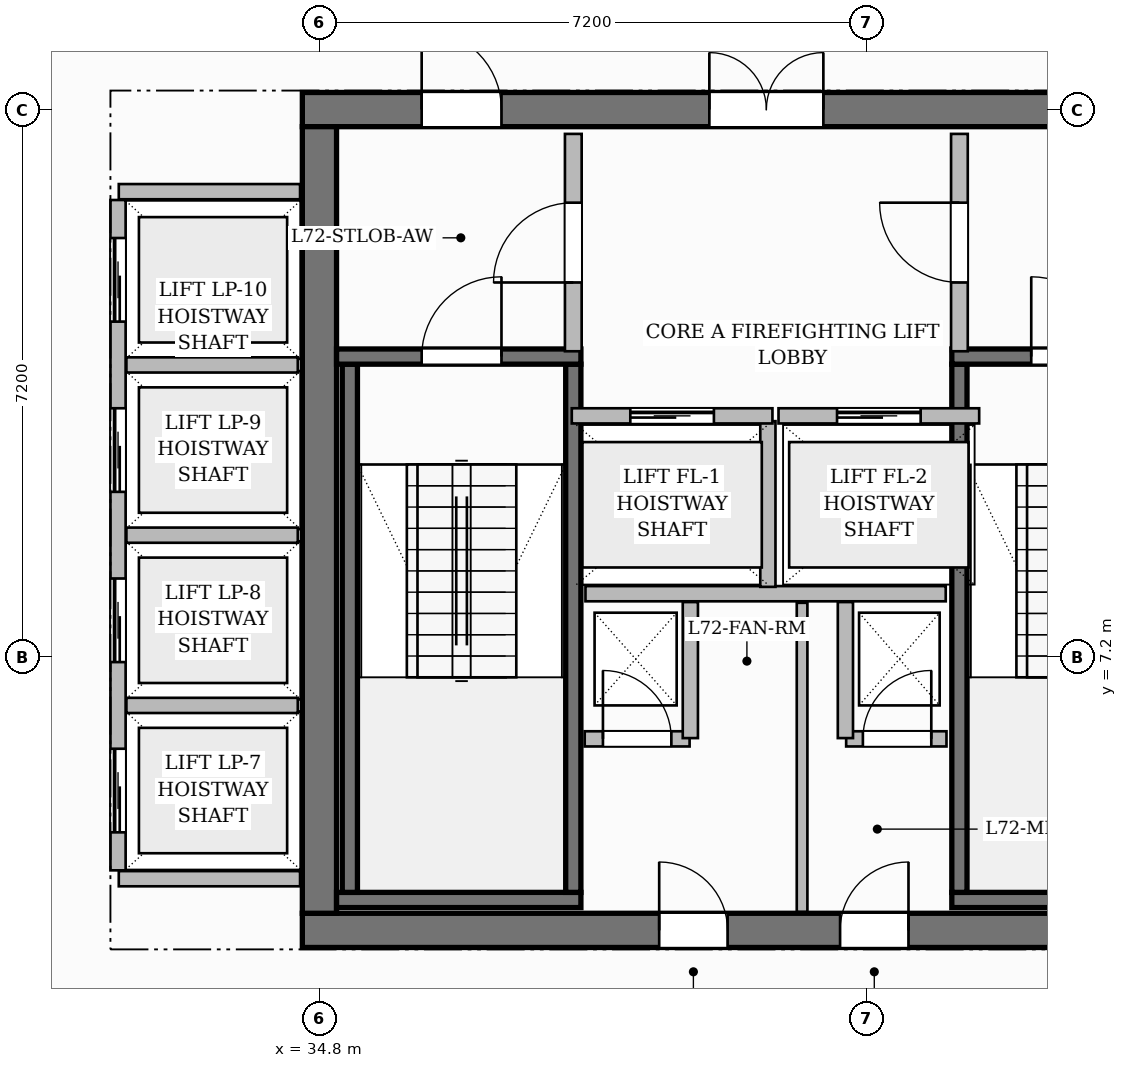
"""IFC4 building model, lengths in metres.
Left out: names, types, materials, properties, quantities, classifications, styles, units other than length and angle.
Written with IfcOpenShell. Run it as: python <this file> out.ifc"""

import sys

from ifc_helpers import new_model, si_unit, direction, frame, frame_2d, origin, place, context, subcontext, project, spatial, rectangle, extrude, source, transform, mapped, element, fill, save


model = new_model("IFC4")
c1 = context("Model", 3, precision=1e-05, world=origin(), true_north=direction((0.0, 1.0)))
c2 = subcontext(c1, "Body", "Model", "MODEL_VIEW")
j1 = project(units=[si_unit("LENGTHUNIT", "METRE"), si_unit("PLANEANGLEUNIT", "RADIAN")], contexts=[c1])
p1 = place(None, origin())
s1 = spatial("IfcSite", under=j1, at=p1, CompositionType="ELEMENT")
p2 = place(p1, origin())
s2 = spatial("IfcBuilding", under=s1, at=p2, CompositionType="ELEMENT")
p3 = place(p2, frame((0.0, 0.0, 286.6)))
s3 = spatial("IfcBuildingStorey", under=s2, at=p3, CompositionType="ELEMENT", Elevation=286.6)
p4 = place(p3, frame((34.575, 3.6, 0.0), z_axis=(0.0, 0.0, 1.0), x_axis=(1.0, 0.0, 0.0)))
e1 = element("IfcWall", 1, at=p4, inside=s3, PredefinedType="SHEAR", context=c2, shape_type="SweptSolid", body=[
    extrude(rectangle(XDim=15.45, YDim=0.45, at=frame_2d((7.725, 0.0))), origin(), (0.0, 0.0, 1.0), 3.85),
])
p5 = place(p4, frame((4.695, 0.0, 0.0)))
e2 = element("IfcOpeningElement", 2, at=p5, cuts=e1, PredefinedType="OPENING", context=c2, shape_type="SweptSolid", body=[
    extrude(rectangle(XDim=0.9, YDim=2.1, at=frame_2d((0.45, 1.05))), frame((0.0, 0.235, 0.0), z_axis=(0.0, -1.0, 0.0), x_axis=(1.0, 0.0, 0.0)), (0.0, 0.0, 1.0), 0.47),
])
p6 = place(p4, frame((7.075, 0.0, 0.0)))
e3 = element("IfcOpeningElement", 3, at=p6, cuts=e1, PredefinedType="OPENING", context=c2, shape_type="SweptSolid", body=[
    extrude(rectangle(XDim=0.9, YDim=2.1, at=frame_2d((0.45, 1.05))), frame((0.0, 0.235, 0.0), z_axis=(0.0, -1.0, 0.0), x_axis=(1.0, 0.0, 0.0)), (0.0, 0.0, 1.0), 0.47),
])
p7 = place(p3, frame((34.575, 14.4, 0.0), z_axis=(0.0, 0.0, 1.0), x_axis=(1.0, 0.0, 0.0)))
e4 = element("IfcWall", 4, at=p7, inside=s3, PredefinedType="SHEAR", context=c2, shape_type="SweptSolid", body=[
    extrude(rectangle(XDim=15.45, YDim=0.45, at=frame_2d((7.725, 0.0))), origin(), (0.0, 0.0, 1.0), 3.85),
])
p8 = place(p7, frame((5.355, 0.0, 0.0)))
e5 = element("IfcOpeningElement", 5, at=p8, cuts=e4, PredefinedType="OPENING", context=c2, shape_type="SweptSolid", body=[
    extrude(rectangle(XDim=1.5, YDim=2.2, at=frame_2d((0.75, 1.1))), frame((0.0, 0.235, 0.0), z_axis=(0.0, -1.0, 0.0), x_axis=(1.0, 0.0, 0.0)), (0.0, 0.0, 1.0), 0.47),
])
p9 = place(p7, frame((1.57, 0.0, 0.0)))
e6 = element("IfcOpeningElement", 6, at=p9, cuts=e4, PredefinedType="OPENING", context=c2, shape_type="SweptSolid", body=[
    extrude(rectangle(XDim=1.05, YDim=2.15, at=frame_2d((0.525, 1.075))), frame((0.0, 0.235, 0.0), z_axis=(0.0, -1.0, 0.0), x_axis=(1.0, 0.0, 0.0)), (0.0, 0.0, 1.0), 0.47),
])
p10 = place(p7, frame((11.2, 0.0, 0.0)))
e7 = element("IfcOpeningElement", 7, at=p10, cuts=e4, PredefinedType="OPENING", context=c2, shape_type="SweptSolid", body=[
    extrude(rectangle(XDim=1.05, YDim=2.15, at=frame_2d((0.525, 1.075))), frame((0.0, 0.235, 0.0), z_axis=(0.0, -1.0, 0.0), x_axis=(1.0, 0.0, 0.0)), (0.0, 0.0, 1.0), 0.47),
])
p11 = place(p3, frame((34.8, 3.825, 0.0), z_axis=(0.0, 0.0, 1.0), x_axis=(0.0, 1.0, 0.0)))
e8 = element("IfcWall", 8, at=p11, inside=s3, PredefinedType="SHEAR", context=c2, shape_type="SweptSolid", body=[
    extrude(rectangle(XDim=10.35, YDim=0.45, at=frame_2d((5.175, 0.0))), origin(), (0.0, 0.0, 1.0), 3.85),
])
p12 = place(p3, frame((35.025, 4.0, 0.0), z_axis=(0.0, 0.0, 1.0), x_axis=(1.0, 0.0, 0.0)))
e9 = element("IfcWall", 9, at=p12, inside=s3, PredefinedType="SHEAR", context=c2, shape_type="SweptSolid", body=[
    extrude(rectangle(XDim=3.215, YDim=0.2, at=frame_2d((1.607, 0.0))), origin(), (0.0, 0.0, 1.0), 3.85),
])
for number, where, z_axis, x_axis in (
    (10, (35.2, 4.1, 0.0), (0.0, 0.0, 1.0), (0.0, 1.0, 0.0)),
    (11, (38.14, 4.1, 0.0), (0.0, 0.0, 1.0), (0.0, 1.0, 0.0)),
):
    element("IfcWall", number, at=place(p3, frame(where, z_axis=z_axis, x_axis=x_axis)), inside=s3, PredefinedType="SHEAR", context=c2, shape_type="SweptSolid", body=[
        extrude(rectangle(XDim=6.95, YDim=0.2, at=frame_2d((3.475, 0.0))), origin(), (0.0, 0.0, 1.0), 3.85),
    ])
p13 = place(p3, frame((35.025, 11.15, 0.0), z_axis=(0.0, 0.0, 1.0), x_axis=(1.0, 0.0, 0.0)))
e12 = element("IfcWall", 12, at=p13, inside=s3, PredefinedType="SHEAR", context=c2, shape_type="SweptSolid", body=[
    extrude(rectangle(XDim=3.215, YDim=0.2, at=frame_2d((1.607, 0.0))), origin(), (0.0, 0.0, 1.0), 3.85),
])
p14 = place(p13, frame((1.12, 0.0, 0.0)))
e13 = element("IfcOpeningElement", 13, at=p14, cuts=e12, PredefinedType="OPENING", context=c2, shape_type="SweptSolid", body=[
    extrude(rectangle(XDim=1.05, YDim=2.2, at=frame_2d((0.525, 1.1))), frame((0.0, 0.11, 0.0), z_axis=(0.0, -1.0, 0.0), x_axis=(1.0, 0.0, 0.0)), (0.0, 0.0, 1.0), 0.22),
])
p15 = place(p3, frame((43.12, 4.0, 0.0), z_axis=(0.0, 0.0, 1.0), x_axis=(1.0, 0.0, 0.0)))
e14 = element("IfcWall", 14, at=p15, inside=s3, PredefinedType="SHEAR", context=c2, shape_type="SweptSolid", body=[
    extrude(rectangle(XDim=6.455, YDim=0.2, at=frame_2d((3.228, 0.0))), origin(), (0.0, 0.0, 1.0), 3.85),
])
p16 = place(p3, frame((43.22, 4.1, 0.0), z_axis=(0.0, 0.0, 1.0), x_axis=(0.0, 1.0, 0.0)))
e15 = element("IfcWall", 15, at=p16, inside=s3, PredefinedType="SHEAR", context=c2, shape_type="SweptSolid", body=[
    extrude(rectangle(XDim=6.95, YDim=0.2, at=frame_2d((3.475, 0.0))), origin(), (0.0, 0.0, 1.0), 3.85),
])
p17 = place(p3, frame((43.12, 11.15, 0.0), z_axis=(0.0, 0.0, 1.0), x_axis=(1.0, 0.0, 0.0)))
e16 = element("IfcWall", 16, at=p17, inside=s3, PredefinedType="SHEAR", context=c2, shape_type="SweptSolid", body=[
    extrude(rectangle(XDim=6.455, YDim=0.2, at=frame_2d((3.228, 0.0))), origin(), (0.0, 0.0, 1.0), 3.85),
])
p18 = place(p17, frame((1.045, 0.0, 0.0)))
e17 = element("IfcOpeningElement", 17, at=p18, cuts=e16, PredefinedType="OPENING", context=c2, shape_type="SweptSolid", body=[
    extrude(rectangle(XDim=1.05, YDim=2.2, at=frame_2d((0.525, 1.1))), frame((0.0, 0.11, 0.0), z_axis=(0.0, -1.0, 0.0), x_axis=(1.0, 0.0, 0.0)), (0.0, 0.0, 1.0), 0.22),
])
p19 = place(p17, frame((4.125, 0.0, 0.0)))
e18 = element("IfcOpeningElement", 18, at=p19, cuts=e16, PredefinedType="OPENING", context=c2, shape_type="SweptSolid", body=[
    extrude(rectangle(XDim=1.05, YDim=2.2, at=frame_2d((0.525, 1.1))), frame((0.0, 0.11, 0.0), z_axis=(0.0, -1.0, 0.0), x_axis=(1.0, 0.0, 0.0)), (0.0, 0.0, 1.0), 0.22),
])
p20 = place(p3, frame((38.3, 8.03, 0.0), z_axis=(0.0, 0.0, 1.0), x_axis=(1.0, 0.0, 0.0)))
e19 = element("IfcWall", 19, at=p20, inside=s3, PredefinedType="PARTITIONING", context=c2, shape_type="SweptSolid", body=[
    extrude(rectangle(XDim=4.74, YDim=0.2, at=frame_2d((2.37, 0.0))), origin(), (0.0, 0.0, 1.0), 3.6),
])
p21 = place(p3, frame((40.7, 8.12, 0.0), z_axis=(0.0, 0.0, 1.0), x_axis=(0.0, 1.0, 0.0)))
e20 = element("IfcWall", 20, at=p21, inside=s3, PredefinedType="PARTITIONING", context=c2, shape_type="SweptSolid", body=[
    extrude(rectangle(XDim=2.18, YDim=0.2, at=frame_2d((1.09, 0.0))), origin(), (0.0, 0.0, 1.0), 3.6),
])
p22 = place(p3, frame((38.14, 11.22, 0.0), z_axis=(0.0, 0.0, 1.0), x_axis=(0.0, 1.0, 0.0)))
e21 = element("IfcWall", 21, at=p22, inside=s3, PredefinedType="PARTITIONING", context=c2, shape_type="SweptSolid", body=[
    extrude(rectangle(XDim=2.86, YDim=0.22, at=frame_2d((1.43, 0.0))), origin(), (0.0, 0.0, 1.0), 3.6),
])
p23 = place(p22, frame((0.905, 0.0, 0.0)))
e22 = element("IfcOpeningElement", 22, at=p23, cuts=e21, PredefinedType="OPENING", context=c2, shape_type="SweptSolid", body=[
    extrude(rectangle(XDim=1.05, YDim=2.15, at=frame_2d((0.525, 1.075))), frame((0.0, 0.12, 0.0), z_axis=(0.0, -1.0, 0.0), x_axis=(1.0, 0.0, 0.0)), (0.0, 0.0, 1.0), 0.24),
])
p24 = place(p3, frame((43.22, 11.22, 0.0), z_axis=(0.0, 0.0, 1.0), x_axis=(0.0, 1.0, 0.0)))
e23 = element("IfcWall", 23, at=p24, inside=s3, PredefinedType="PARTITIONING", context=c2, shape_type="SweptSolid", body=[
    extrude(rectangle(XDim=2.86, YDim=0.22, at=frame_2d((1.43, 0.0))), origin(), (0.0, 0.0, 1.0), 3.6),
])
p25 = place(p24, frame((0.905, 0.0, 0.0)))
e24 = element("IfcOpeningElement", 24, at=p25, cuts=e23, PredefinedType="OPENING", context=c2, shape_type="SweptSolid", body=[
    extrude(rectangle(XDim=1.05, YDim=2.15, at=frame_2d((0.525, 1.075))), frame((0.0, 0.12, 0.0), z_axis=(0.0, -1.0, 0.0), x_axis=(1.0, 0.0, 0.0)), (0.0, 0.0, 1.0), 0.24),
])
p26 = place(p3, frame((38.29, 6.12, 0.0), z_axis=(0.0, 0.0, 1.0), x_axis=(1.0, 0.0, 0.0)))
e25 = element("IfcWall", 25, at=p26, inside=s3, PredefinedType="PARTITIONING", context=c2, shape_type="SweptSolid", body=[
    extrude(rectangle(XDim=1.38, YDim=0.2, at=frame_2d((0.69, 0.0))), origin(), (0.0, 0.0, 1.0), 3.6),
])
p27 = place(p26, frame((0.24, 0.0, 0.0)))
e26 = element("IfcOpeningElement", 26, at=p27, cuts=e25, PredefinedType="OPENING", context=c2, shape_type="SweptSolid", body=[
    extrude(rectangle(XDim=0.9, YDim=2.1, at=frame_2d((0.45, 1.05))), frame((0.0, 0.11, 0.0), z_axis=(0.0, -1.0, 0.0), x_axis=(1.0, 0.0, 0.0)), (0.0, 0.0, 1.0), 0.22),
])
p28 = place(p3, frame((39.68, 6.13, 0.0), z_axis=(0.0, 0.0, 1.0), x_axis=(0.0, 1.0, 0.0)))
e27 = element("IfcWall", 27, at=p28, inside=s3, PredefinedType="PARTITIONING", context=c2, shape_type="SweptSolid", body=[
    extrude(rectangle(XDim=1.79, YDim=0.2, at=frame_2d((0.895, 0.0))), origin(), (0.0, 0.0, 1.0), 3.6),
])
p29 = place(p3, frame((41.73, 6.12, 0.0), z_axis=(0.0, 0.0, 1.0), x_axis=(1.0, 0.0, 0.0)))
e28 = element("IfcWall", 28, at=p29, inside=s3, PredefinedType="PARTITIONING", context=c2, shape_type="SweptSolid", body=[
    extrude(rectangle(XDim=1.32, YDim=0.2, at=frame_2d((0.66, 0.0))), origin(), (0.0, 0.0, 1.0), 3.6),
])
p30 = place(p29, frame((0.22, 0.0, 0.0)))
e29 = element("IfcOpeningElement", 29, at=p30, cuts=e28, PredefinedType="OPENING", context=c2, shape_type="SweptSolid", body=[
    extrude(rectangle(XDim=0.9, YDim=2.1, at=frame_2d((0.45, 1.05))), frame((0.0, 0.11, 0.0), z_axis=(0.0, -1.0, 0.0), x_axis=(1.0, 0.0, 0.0)), (0.0, 0.0, 1.0), 0.22),
])
p31 = place(p3, frame((41.72, 6.13, 0.0), z_axis=(0.0, 0.0, 1.0), x_axis=(0.0, 1.0, 0.0)))
e30 = element("IfcWall", 30, at=p31, inside=s3, PredefinedType="PARTITIONING", context=c2, shape_type="SweptSolid", body=[
    extrude(rectangle(XDim=1.79, YDim=0.2, at=frame_2d((0.895, 0.0))), origin(), (0.0, 0.0, 1.0), 3.6),
])
p32 = place(p3, frame((41.15, 3.845, 0.0), z_axis=(0.0, 0.0, 1.0), x_axis=(0.0, 1.0, 0.0)))
e31 = element("IfcWall", 31, at=p32, inside=s3, PredefinedType="PARTITIONING", context=c2, shape_type="SweptSolid", body=[
    extrude(rectangle(XDim=4.065, YDim=0.14, at=frame_2d((2.032, 0.0))), origin(), (0.0, 0.0, 1.0), 3.6),
])
for number, where, z_axis, x_axis in (
    (32, (32.16, 4.28, 0.0), (0.0, 0.0, 1.0), (1.0, 0.0, 0.0)),
    (33, (32.16, 13.32, 0.0), (0.0, 0.0, 1.0), (1.0, 0.0, 0.0)),
):
    element("IfcWall", number, at=place(p3, frame(where, z_axis=z_axis, x_axis=x_axis)), inside=s3, PredefinedType="PARTITIONING", context=c2, shape_type="SweptSolid", body=[
        extrude(rectangle(XDim=2.385, YDim=0.2, at=frame_2d((1.192, 0.0))), origin(), (0.0, 0.0, 1.0), 3.6),
    ])
p33 = place(p3, frame((32.15, 4.39, 0.0), z_axis=(0.0, 0.0, 1.0), x_axis=(0.0, 1.0, 0.0)))
e34 = element("IfcWall", 34, at=p33, inside=s3, PredefinedType="PARTITIONING", context=c2, shape_type="SweptSolid", body=[
    extrude(rectangle(XDim=8.82, YDim=0.2, at=frame_2d((4.41, 0.0))), origin(), (0.0, 0.0, 1.0), 3.6),
])
p34 = place(p33, frame((0.5, 0.0, 0.0)))
e35 = element("IfcOpeningElement", 35, at=p34, cuts=e34, PredefinedType="OPENING", context=c2, shape_type="SweptSolid", body=[
    extrude(rectangle(XDim=1.1, YDim=2.2, at=frame_2d((0.55, 1.1))), frame((0.0, 0.11, 0.0), z_axis=(0.0, -1.0, 0.0), x_axis=(1.0, 0.0, 0.0)), (0.0, 0.0, 1.0), 0.22),
])
p35 = place(p33, frame((2.74, 0.0, 0.0)))
e36 = element("IfcOpeningElement", 36, at=p35, cuts=e34, PredefinedType="OPENING", context=c2, shape_type="SweptSolid", body=[
    extrude(rectangle(XDim=1.1, YDim=2.2, at=frame_2d((0.55, 1.1))), frame((0.0, 0.11, 0.0), z_axis=(0.0, -1.0, 0.0), x_axis=(1.0, 0.0, 0.0)), (0.0, 0.0, 1.0), 0.22),
])
p36 = place(p33, frame((4.98, 0.0, 0.0)))
e37 = element("IfcOpeningElement", 37, at=p36, cuts=e34, PredefinedType="OPENING", context=c2, shape_type="SweptSolid", body=[
    extrude(rectangle(XDim=1.1, YDim=2.2, at=frame_2d((0.55, 1.1))), frame((0.0, 0.11, 0.0), z_axis=(0.0, -1.0, 0.0), x_axis=(1.0, 0.0, 0.0)), (0.0, 0.0, 1.0), 0.22),
])
p37 = place(p33, frame((7.22, 0.0, 0.0)))
e38 = element("IfcOpeningElement", 38, at=p37, cuts=e34, PredefinedType="OPENING", context=c2, shape_type="SweptSolid", body=[
    extrude(rectangle(XDim=1.1, YDim=2.2, at=frame_2d((0.55, 1.1))), frame((0.0, 0.11, 0.0), z_axis=(0.0, -1.0, 0.0), x_axis=(1.0, 0.0, 0.0)), (0.0, 0.0, 1.0), 0.22),
])
for number, where, z_axis, x_axis in (
    (39, (32.26, 6.56, 0.0), (0.0, 0.0, 1.0), (1.0, 0.0, 0.0)),
    (40, (32.26, 8.8, 0.0), (0.0, 0.0, 1.0), (1.0, 0.0, 0.0)),
    (41, (32.26, 11.04, 0.0), (0.0, 0.0, 1.0), (1.0, 0.0, 0.0)),
):
    element("IfcWall", number, at=place(p3, frame(where, z_axis=z_axis, x_axis=x_axis)), inside=s3, PredefinedType="PARTITIONING", context=c2, shape_type="SweptSolid", body=[
        extrude(rectangle(XDim=2.255, YDim=0.2, at=frame_2d((1.127, 0.0))), origin(), (0.0, 0.0, 1.0), 3.6),
    ])
p38 = place(p3, frame((38.12, 10.37, 0.0), z_axis=(0.0, 0.0, 1.0), x_axis=(1.0, 0.0, 0.0)))
e42 = element("IfcWall", 42, at=p38, inside=s3, PredefinedType="PARTITIONING", context=c2, shape_type="SweptSolid", body=[
    extrude(rectangle(XDim=2.64, YDim=0.2, at=frame_2d((1.32, 0.0))), origin(), (0.0, 0.0, 1.0), 3.6),
])
p39 = place(p38, frame((0.77, 0.0, 0.0)))
e43 = element("IfcOpeningElement", 43, at=p39, cuts=e42, PredefinedType="OPENING", context=c2, shape_type="SweptSolid", body=[
    extrude(rectangle(XDim=1.1, YDim=2.2, at=frame_2d((0.55, 1.1))), frame((0.0, 0.11, 0.0), z_axis=(0.0, -1.0, 0.0), x_axis=(1.0, 0.0, 0.0)), (0.0, 0.0, 1.0), 0.22),
])
p40 = place(p3, frame((40.84, 10.37, 0.0), z_axis=(0.0, 0.0, 1.0), x_axis=(1.0, 0.0, 0.0)))
e44 = element("IfcWall", 44, at=p40, inside=s3, PredefinedType="PARTITIONING", context=c2, shape_type="SweptSolid", body=[
    extrude(rectangle(XDim=2.64, YDim=0.2, at=frame_2d((1.32, 0.0))), origin(), (0.0, 0.0, 1.0), 3.6),
])
p41 = place(p40, frame((0.77, 0.0, 0.0)))
e45 = element("IfcOpeningElement", 45, at=p41, cuts=e44, PredefinedType="OPENING", context=c2, shape_type="SweptSolid", body=[
    extrude(rectangle(XDim=1.1, YDim=2.2, at=frame_2d((0.55, 1.1))), frame((0.0, 0.11, 0.0), z_axis=(0.0, -1.0, 0.0), x_axis=(1.0, 0.0, 0.0)), (0.0, 0.0, 1.0), 0.22),
])
m1 = source(origin(), c2, "Body", "SweptSolid", [
    extrude(rectangle(XDim=1.05, YDim=2.2, at=frame_2d((0.525, 1.1))), frame((0.0, 0.025, 0.0), z_axis=(0.0, -1.0, 0.0), x_axis=(1.0, 0.0, 0.0)), (0.0, 0.0, 1.0), 0.05),
])
p42 = place(p14, origin())
e46 = element("IfcDoor", 46, at=p42, inside=s3, OperationType="SINGLE_SWING_RIGHT", PredefinedType="DOOR", context=c2, shape_type="MappedRepresentation", body=[
    mapped(m1, transform((0.0, 0.0, 0.0), scale=1.0)),
])
fill(e13, e46)
p43 = place(p18, origin())
e47 = element("IfcDoor", 47, at=p43, inside=s3, OperationType="SINGLE_SWING_LEFT", PredefinedType="DOOR", context=c2, shape_type="MappedRepresentation", body=[
    mapped(m1, transform((0.0, 0.0, 0.0), scale=1.0)),
])
fill(e17, e47)
m2 = source(origin(), c2, "Body", "SweptSolid", [
    extrude(rectangle(XDim=1.05, YDim=2.15, at=frame_2d((0.525, 1.075))), frame((0.0, 0.025, 0.0), z_axis=(0.0, -1.0, 0.0), x_axis=(1.0, 0.0, 0.0)), (0.0, 0.0, 1.0), 0.05),
])
p44 = place(p23, origin())
e48 = element("IfcDoor", 48, at=p44, inside=s3, OperationType="SINGLE_SWING_LEFT", PredefinedType="DOOR", context=c2, shape_type="MappedRepresentation", body=[
    mapped(m2, transform((0.0, 0.0, 0.0), scale=1.0)),
])
fill(e22, e48)
p45 = place(p25, origin())
e49 = element("IfcDoor", 49, at=p45, inside=s3, OperationType="SINGLE_SWING_RIGHT", PredefinedType="DOOR", context=c2, shape_type="MappedRepresentation", body=[
    mapped(m2, transform((0.0, 0.0, 0.0), scale=1.0)),
])
fill(e24, e49)
m3 = source(origin(), c2, "Body", "SweptSolid", [
    extrude(rectangle(XDim=1.5, YDim=2.2, at=frame_2d((0.75, 1.1))), frame((0.0, 0.025, 0.0), z_axis=(0.0, -1.0, 0.0), x_axis=(1.0, 0.0, 0.0)), (0.0, 0.0, 1.0), 0.05),
])
p46 = place(p8, origin())
e50 = element("IfcDoor", 50, at=p46, inside=s3, OperationType="DOUBLE_DOOR_SINGLE_SWING", PredefinedType="DOOR", context=c2, shape_type="MappedRepresentation", body=[
    mapped(m3, transform((0.0, 0.0, 0.0), scale=1.0)),
])
fill(e5, e50)
p47 = place(p9, origin())
e51 = element("IfcDoor", 51, at=p47, inside=s3, OperationType="SINGLE_SWING_LEFT", PredefinedType="DOOR", context=c2, shape_type="MappedRepresentation", body=[
    mapped(m2, transform((0.0, 0.0, 0.0), scale=1.0)),
])
fill(e6, e51)
m4 = source(origin(), c2, "Body", "SweptSolid", [
    extrude(rectangle(XDim=0.9, YDim=2.1, at=frame_2d((0.45, 1.05))), frame((0.0, 0.025, 0.0), z_axis=(0.0, -1.0, 0.0), x_axis=(1.0, 0.0, 0.0)), (0.0, 0.0, 1.0), 0.05),
])
p48 = place(p27, origin())
e52 = element("IfcDoor", 52, at=p48, inside=s3, OperationType="SINGLE_SWING_LEFT", PredefinedType="DOOR", context=c2, shape_type="MappedRepresentation", body=[
    mapped(m4, transform((0.0, 0.0, 0.0), scale=1.0)),
])
fill(e26, e52)
p49 = place(p30, origin())
e53 = element("IfcDoor", 53, at=p49, inside=s3, OperationType="SINGLE_SWING_RIGHT", PredefinedType="DOOR", context=c2, shape_type="MappedRepresentation", body=[
    mapped(m4, transform((0.0, 0.0, 0.0), scale=1.0)),
])
fill(e29, e53)
p50 = place(p5, origin())
e54 = element("IfcDoor", 54, at=p50, inside=s3, OperationType="SINGLE_SWING_LEFT", PredefinedType="DOOR", context=c2, shape_type="MappedRepresentation", body=[
    mapped(m4, transform((0.0, 0.0, 0.0), scale=1.0)),
])
fill(e2, e54)
p51 = place(p6, origin())
e55 = element("IfcDoor", 55, at=p51, inside=s3, OperationType="SINGLE_SWING_RIGHT", PredefinedType="DOOR", context=c2, shape_type="MappedRepresentation", body=[
    mapped(m4, transform((0.0, 0.0, 0.0), scale=1.0)),
])
fill(e3, e55)
m5 = source(origin(), c2, "Body", "SweptSolid", [
    extrude(rectangle(XDim=1.1, YDim=2.2, at=frame_2d((0.55, 1.1))), frame((0.0, 0.025, 0.0), z_axis=(0.0, -1.0, 0.0), x_axis=(1.0, 0.0, 0.0)), (0.0, 0.0, 1.0), 0.05),
])
p52 = place(p39, origin())
e56 = element("IfcDoor", 56, at=p52, inside=s3, OperationType="SLIDING_TO_LEFT", PredefinedType="DOOR", context=c2, shape_type="MappedRepresentation", body=[
    mapped(m5, transform((0.0, 0.0, 0.0), scale=1.0)),
])
fill(e43, e56)
p53 = place(p41, origin())
e57 = element("IfcDoor", 57, at=p53, inside=s3, OperationType="SLIDING_TO_LEFT", PredefinedType="DOOR", context=c2, shape_type="MappedRepresentation", body=[
    mapped(m5, transform((0.0, 0.0, 0.0), scale=1.0)),
])
fill(e45, e57)
p54 = place(p34, origin())
e58 = element("IfcDoor", 58, at=p54, inside=s3, OperationType="SLIDING_TO_LEFT", PredefinedType="DOOR", context=c2, shape_type="MappedRepresentation", body=[
    mapped(m5, transform((0.0, 0.0, 0.0), scale=1.0)),
])
fill(e35, e58)
p55 = place(p35, origin())
e59 = element("IfcDoor", 59, at=p55, inside=s3, OperationType="SLIDING_TO_LEFT", PredefinedType="DOOR", context=c2, shape_type="MappedRepresentation", body=[
    mapped(m5, transform((0.0, 0.0, 0.0), scale=1.0)),
])
fill(e36, e59)
p56 = place(p36, origin())
e60 = element("IfcDoor", 60, at=p56, inside=s3, OperationType="SLIDING_TO_LEFT", PredefinedType="DOOR", context=c2, shape_type="MappedRepresentation", body=[
    mapped(m5, transform((0.0, 0.0, 0.0), scale=1.0)),
])
fill(e37, e60)
p57 = place(p37, origin())
e61 = element("IfcDoor", 61, at=p57, inside=s3, OperationType="SLIDING_TO_LEFT", PredefinedType="DOOR", context=c2, shape_type="MappedRepresentation", body=[
    mapped(m5, transform((0.0, 0.0, 0.0), scale=1.0)),
])
fill(e38, e61)
save(model, sys.argv[1])
